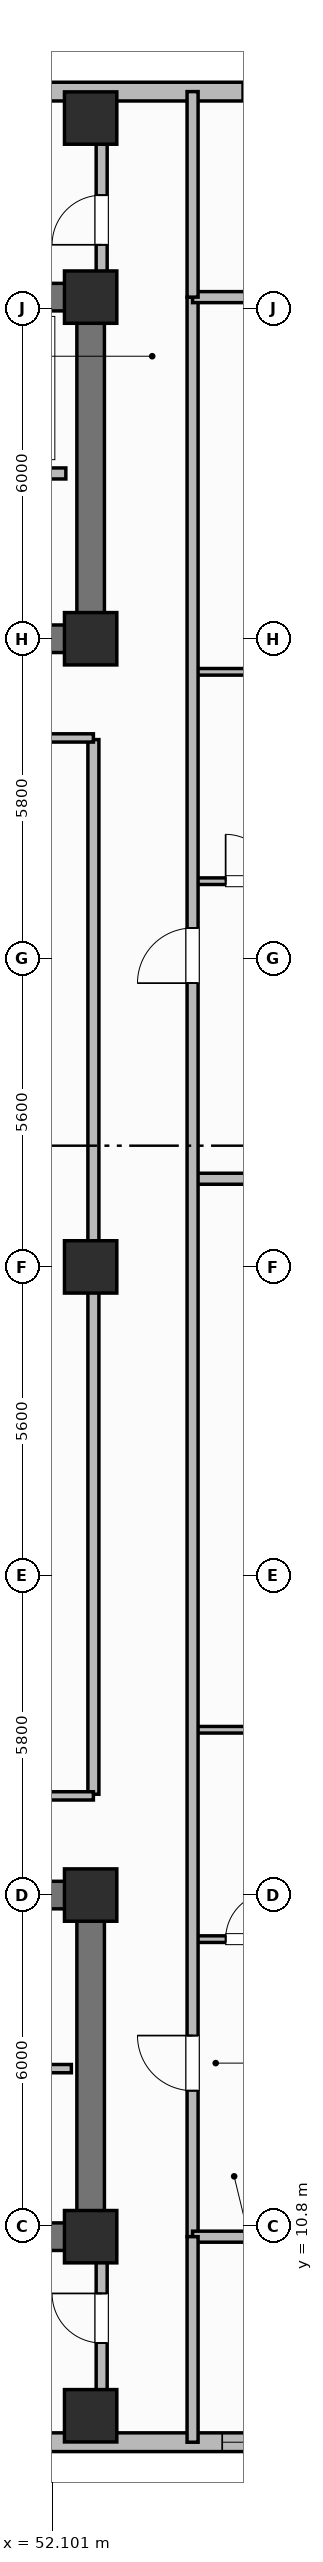
"""IFC4 building model, lengths in metres.
Left out: names, types, materials, properties, quantities, classifications, styles, units other than length and angle.
Written with IfcOpenShell. Run it as: python <this file> out.ifc"""

import sys

from ifc_helpers import new_model, si_unit, direction, frame, frame_2d, origin, origin_2d, place, context, subcontext, project, spatial, rectangle, extrude, element, fill, save


model = new_model("IFC4")
c1 = context("Model", 3, precision=1e-05, world=origin(), true_north=direction((0.0, 1.0)))
c2 = subcontext(c1, "Body", "Model", "MODEL_VIEW")
j1 = project(units=[si_unit("LENGTHUNIT", "METRE"), si_unit("PLANEANGLEUNIT", "RADIAN")], contexts=[c1])
p1 = place(None, origin())
s1 = spatial("IfcSite", under=j1, at=p1, CompositionType="ELEMENT")
p2 = place(p1, origin())
s2 = spatial("IfcBuilding", under=s1, at=p2, CompositionType="ELEMENT")
p3 = place(p2, frame((0.0, 0.0, 162.6)))
s3 = spatial("IfcBuildingStorey", under=s2, at=p3, CompositionType="ELEMENT", Elevation=162.6)
p4 = place(p3, frame((52.8, 10.6, 0.0), z_axis=(0.0, 0.0, 1.0), x_axis=(-1.0, 0.0, 0.0)))
e1 = element("IfcWall", 1, at=p4, inside=s3, PredefinedType="SHEAR", context=c2, shape_type="SweptSolid", body=[
    extrude(rectangle(XDim=27.2, YDim=0.5, at=frame_2d((13.6, 0.0))), origin(), (0.0, 0.0, 1.0), 3.7),
])
p5 = place(p3, frame((52.8, 10.85, 0.0), z_axis=(0.0, 0.0, 1.0), x_axis=(0.0, 1.0, 0.0)))
e2 = element("IfcWall", 2, at=p5, inside=s3, PredefinedType="SHEAR", context=c2, shape_type="SweptSolid", body=[
    extrude(rectangle(XDim=5.7, YDim=0.5, at=frame_2d((2.85, 0.0))), origin(), (0.0, 0.0, 1.0), 3.7),
])
p6 = place(p3, frame((25.6, 16.8, 0.0), z_axis=(0.0, 0.0, 1.0), x_axis=(1.0, 0.0, 0.0)))
e3 = element("IfcWall", 3, at=p6, inside=s3, PredefinedType="SHEAR", context=c2, shape_type="SweptSolid", body=[
    extrude(rectangle(XDim=27.2, YDim=0.5, at=frame_2d((13.6, 0.0))), origin(), (0.0, 0.0, 1.0), 3.7),
])
p7 = place(p6, frame((1.7, 0.0, 0.0)))
e4 = element("IfcOpeningElement", 4, at=p7, cuts=e3, PredefinedType="OPENING", context=c2, shape_type="SweptSolid", body=[
    extrude(rectangle(XDim=1.1, YDim=2.15, at=frame_2d((0.55, 1.075))), frame((0.0, 0.26, 0.0), z_axis=(0.0, -1.0, 0.0), x_axis=(1.0, 0.0, 0.0)), (0.0, 0.0, 1.0), 0.52),
])
p8 = place(p6, frame((4.45, 0.0, 0.0)))
e5 = element("IfcOpeningElement", 5, at=p8, cuts=e3, PredefinedType="OPENING", context=c2, shape_type="SweptSolid", body=[
    extrude(rectangle(XDim=0.85, YDim=2.1, at=frame_2d((0.425, 1.05))), frame((0.0, 0.26, 0.0), z_axis=(0.0, -1.0, 0.0), x_axis=(1.0, 0.0, 0.0)), (0.0, 0.0, 1.0), 0.52),
])
p9 = place(p6, frame((6.5, 0.0, 0.0)))
e6 = element("IfcOpeningElement", 6, at=p9, cuts=e3, PredefinedType="OPENING", context=c2, shape_type="SweptSolid", body=[
    extrude(rectangle(XDim=0.85, YDim=2.1, at=frame_2d((0.425, 1.05))), frame((0.0, 0.26, 0.0), z_axis=(0.0, -1.0, 0.0), x_axis=(1.0, 0.0, 0.0)), (0.0, 0.0, 1.0), 0.52),
])
p10 = place(p6, frame((13.0, 0.0, 0.0)))
e7 = element("IfcOpeningElement", 7, at=p10, cuts=e3, PredefinedType="OPENING", context=c2, shape_type="SweptSolid", body=[
    extrude(rectangle(XDim=1.2, YDim=2.15, at=frame_2d((0.6, 1.075))), frame((0.0, 0.26, 0.0), z_axis=(0.0, -1.0, 0.0), x_axis=(1.0, 0.0, 0.0)), (0.0, 0.0, 1.0), 0.52),
])
p11 = place(p6, frame((19.8, 0.0, 0.0)))
e8 = element("IfcOpeningElement", 8, at=p11, cuts=e3, PredefinedType="OPENING", context=c2, shape_type="SweptSolid", body=[
    extrude(rectangle(XDim=0.85, YDim=2.1, at=frame_2d((0.425, 1.05))), frame((0.0, 0.26, 0.0), z_axis=(0.0, -1.0, 0.0), x_axis=(1.0, 0.0, 0.0)), (0.0, 0.0, 1.0), 0.52),
])
p12 = place(p6, frame((24.2, 0.0, 0.0)))
e9 = element("IfcOpeningElement", 9, at=p12, cuts=e3, PredefinedType="OPENING", context=c2, shape_type="SweptSolid", body=[
    extrude(rectangle(XDim=0.85, YDim=2.1, at=frame_2d((0.425, 1.05))), frame((0.0, 0.26, 0.0), z_axis=(0.0, -1.0, 0.0), x_axis=(1.0, 0.0, 0.0)), (0.0, 0.0, 1.0), 0.52),
])
p13 = place(p3, frame((25.6, 45.8, 0.0), z_axis=(0.0, 0.0, 1.0), x_axis=(1.0, 0.0, 0.0)))
e10 = element("IfcWall", 10, at=p13, inside=s3, PredefinedType="SHEAR", context=c2, shape_type="SweptSolid", body=[
    extrude(rectangle(XDim=27.2, YDim=0.5, at=frame_2d((13.6, 0.0))), origin(), (0.0, 0.0, 1.0), 3.7),
])
p14 = place(p3, frame((52.8, 39.85, 0.0), z_axis=(0.0, 0.0, 1.0), x_axis=(0.0, 1.0, 0.0)))
e11 = element("IfcWall", 11, at=p14, inside=s3, PredefinedType="SHEAR", context=c2, shape_type="SweptSolid", body=[
    extrude(rectangle(XDim=5.7, YDim=0.5, at=frame_2d((2.85, 0.0))), origin(), (0.0, 0.0, 1.0), 3.7),
])
p15 = place(p3, frame((52.8, 39.6, 0.0), z_axis=(0.0, 0.0, 1.0), x_axis=(-1.0, 0.0, 0.0)))
e12 = element("IfcWall", 12, at=p15, inside=s3, PredefinedType="SHEAR", context=c2, shape_type="SweptSolid", body=[
    extrude(rectangle(XDim=27.2, YDim=0.5, at=frame_2d((13.6, 0.0))), origin(), (0.0, 0.0, 1.0), 3.7),
])
p16 = place(p15, frame((24.3, 0.0, 0.0)))
e13 = element("IfcOpeningElement", 13, at=p16, cuts=e12, PredefinedType="OPENING", context=c2, shape_type="SweptSolid", body=[
    extrude(rectangle(XDim=1.1, YDim=2.15, at=frame_2d((0.55, 1.075))), frame((0.0, 0.26, 0.0), z_axis=(0.0, -1.0, 0.0), x_axis=(1.0, 0.0, 0.0)), (0.0, 0.0, 1.0), 0.52),
])
p17 = place(p15, frame((21.85, 0.0, 0.0)))
e14 = element("IfcOpeningElement", 14, at=p17, cuts=e12, PredefinedType="OPENING", context=c2, shape_type="SweptSolid", body=[
    extrude(rectangle(XDim=0.85, YDim=2.1, at=frame_2d((0.425, 1.05))), frame((0.0, 0.26, 0.0), z_axis=(0.0, -1.0, 0.0), x_axis=(1.0, 0.0, 0.0)), (0.0, 0.0, 1.0), 0.52),
])
p18 = place(p15, frame((19.85, 0.0, 0.0)))
e15 = element("IfcOpeningElement", 15, at=p18, cuts=e12, PredefinedType="OPENING", context=c2, shape_type="SweptSolid", body=[
    extrude(rectangle(XDim=0.85, YDim=2.1, at=frame_2d((0.425, 1.05))), frame((0.0, 0.26, 0.0), z_axis=(0.0, -1.0, 0.0), x_axis=(1.0, 0.0, 0.0)), (0.0, 0.0, 1.0), 0.52),
])
p19 = place(p15, frame((15.1, 0.0, 0.0)))
e16 = element("IfcOpeningElement", 16, at=p19, cuts=e12, PredefinedType="OPENING", context=c2, shape_type="SweptSolid", body=[
    extrude(rectangle(XDim=1.2, YDim=2.15, at=frame_2d((0.6, 1.075))), frame((0.0, 0.26, 0.0), z_axis=(0.0, -1.0, 0.0), x_axis=(1.0, 0.0, 0.0)), (0.0, 0.0, 1.0), 0.52),
])
p20 = place(p15, frame((12.6, 0.0, 0.0)))
e17 = element("IfcOpeningElement", 17, at=p20, cuts=e12, PredefinedType="OPENING", context=c2, shape_type="SweptSolid", body=[
    extrude(rectangle(XDim=0.85, YDim=2.1, at=frame_2d((0.425, 1.05))), frame((0.0, 0.26, 0.0), z_axis=(0.0, -1.0, 0.0), x_axis=(1.0, 0.0, 0.0)), (0.0, 0.0, 1.0), 0.52),
])
p21 = place(p15, frame((10.85, 0.0, 0.0)))
e18 = element("IfcOpeningElement", 18, at=p21, cuts=e12, PredefinedType="OPENING", context=c2, shape_type="SweptSolid", body=[
    extrude(rectangle(XDim=0.85, YDim=2.1, at=frame_2d((0.425, 1.05))), frame((0.0, 0.26, 0.0), z_axis=(0.0, -1.0, 0.0), x_axis=(1.0, 0.0, 0.0)), (0.0, 0.0, 1.0), 0.52),
])
p22 = place(p15, frame((7.35, 0.0, 0.0)))
e19 = element("IfcOpeningElement", 19, at=p22, cuts=e12, PredefinedType="OPENING", context=c2, shape_type="SweptSolid", body=[
    extrude(rectangle(XDim=0.85, YDim=2.1, at=frame_2d((0.425, 1.05))), frame((0.0, 0.26, 0.0), z_axis=(0.0, -1.0, 0.0), x_axis=(1.0, 0.0, 0.0)), (0.0, 0.0, 1.0), 0.52),
])
p23 = place(p15, frame((5.35, 0.0, 0.0)))
e20 = element("IfcOpeningElement", 20, at=p23, cuts=e12, PredefinedType="OPENING", context=c2, shape_type="SweptSolid", body=[
    extrude(rectangle(XDim=0.85, YDim=2.1, at=frame_2d((0.425, 1.05))), frame((0.0, 0.26, 0.0), z_axis=(0.0, -1.0, 0.0), x_axis=(1.0, 0.0, 0.0)), (0.0, 0.0, 1.0), 0.52),
])
p24 = place(p15, frame((2.0, 0.0, 0.0)))
e21 = element("IfcOpeningElement", 21, at=p24, cuts=e12, PredefinedType="OPENING", context=c2, shape_type="SweptSolid", body=[
    extrude(rectangle(XDim=0.85, YDim=2.1, at=frame_2d((0.425, 1.05))), frame((0.0, 0.26, 0.0), z_axis=(0.0, -1.0, 0.0), x_axis=(1.0, 0.0, 0.0)), (0.0, 0.0, 1.0), 0.52),
])
for number, where, z_axis, x_axis in (
    (22, (52.8, 10.6, 0.0), (0.0, 0.0, 1.0), (1.0, 0.0, 0.0)),
    (23, (52.8, 16.8, 0.0), (0.0, 0.0, 1.0), (1.0, 0.0, 0.0)),
    (24, (52.8, 39.6, 0.0), (0.0, 0.0, 1.0), (1.0, 0.0, 0.0)),
    (25, (52.8, 45.8, 0.0), (0.0, 0.0, 1.0), (1.0, 0.0, 0.0)),
    (26, (52.8, 28.2, 0.0), (0.0, 0.0, 1.0), (1.0, 0.0, 0.0)),
    (27, (52.8, 7.35, 0.0), (0.0, 0.0, 1.0), (1.0, 0.0, 0.0)),
    (28, (52.8, 49.05, 0.0), (0.0, 0.0, 1.0), (1.0, 0.0, 0.0)),
):
    element("IfcColumn", number, at=place(p3, frame(where, z_axis=z_axis, x_axis=x_axis)), inside=s3, PredefinedType="COLUMN", context=c2, shape_type="SweptSolid", body=[
        extrude(rectangle(XDim=0.95, YDim=0.95, at=origin_2d()), origin(), (0.0, 0.0, 1.0), 3.7),
    ])
p25 = place(p3, frame((42.4, 6.87, 0.0), z_axis=(0.0, 0.0, 1.0), x_axis=(1.0, 0.0, 0.0)))
e29 = element("IfcWall", 29, at=p25, inside=s3, PredefinedType="SOLIDWALL", context=c2, shape_type="SweptSolid", body=[
    extrude(rectangle(XDim=15.8, YDim=0.34, at=frame_2d((7.9, 0.0))), origin(), (0.0, 0.0, 1.0), 2.72),
])
p26 = place(p25, frame((2.262, 0.0, 0.75)))
e30 = element("IfcOpeningElement", 30, at=p26, cuts=e29, PredefinedType="OPENING", context=c2, shape_type="SweptSolid", body=[
    extrude(rectangle(XDim=1.8, YDim=1.85, at=frame_2d((0.9, 0.925))), frame((0.0, 0.18, 0.0), z_axis=(0.0, -1.0, 0.0), x_axis=(1.0, 0.0, 0.0)), (0.0, 0.0, 1.0), 0.36),
])
p27 = place(p25, frame((5.188, 0.0, 0.75)))
e31 = element("IfcOpeningElement", 31, at=p27, cuts=e29, PredefinedType="OPENING", context=c2, shape_type="SweptSolid", body=[
    extrude(rectangle(XDim=1.8, YDim=1.85, at=frame_2d((0.9, 0.925))), frame((0.0, 0.18, 0.0), z_axis=(0.0, -1.0, 0.0), x_axis=(1.0, 0.0, 0.0)), (0.0, 0.0, 1.0), 0.36),
])
p28 = place(p25, frame((12.788, 0.0, 0.75)))
e32 = element("IfcOpeningElement", 32, at=p28, cuts=e29, PredefinedType="OPENING", context=c2, shape_type="SweptSolid", body=[
    extrude(rectangle(XDim=1.8, YDim=1.85, at=frame_2d((0.9, 0.925))), frame((0.0, 0.18, 0.0), z_axis=(0.0, -1.0, 0.0), x_axis=(1.0, 0.0, 0.0)), (0.0, 0.0, 1.0), 0.36),
])
p29 = place(p3, frame((58.2, 49.53, 0.0), z_axis=(0.0, 0.0, 1.0), x_axis=(-1.0, 0.0, 0.0)))
e33 = element("IfcWall", 33, at=p29, inside=s3, PredefinedType="SOLIDWALL", context=c2, shape_type="SweptSolid", body=[
    extrude(rectangle(XDim=15.8, YDim=0.34, at=frame_2d((7.9, 0.0))), origin(), (0.0, 0.0, 1.0), 2.72),
])
p30 = place(p29, frame((1.55, 0.0, 0.95)))
e34 = element("IfcOpeningElement", 34, at=p30, cuts=e33, PredefinedType="OPENING", context=c2, shape_type="SweptSolid", body=[
    extrude(rectangle(XDim=1.1, YDim=1.65, at=frame_2d((0.55, 0.825))), frame((0.0, 0.18, 0.0), z_axis=(0.0, -1.0, 0.0), x_axis=(1.0, 0.0, 0.0)), (0.0, 0.0, 1.0), 0.36),
])
p31 = place(p29, frame((7.35, 0.0, 0.95)))
e35 = element("IfcOpeningElement", 35, at=p31, cuts=e33, PredefinedType="OPENING", context=c2, shape_type="SweptSolid", body=[
    extrude(rectangle(XDim=1.1, YDim=1.65, at=frame_2d((0.55, 0.825))), frame((0.0, 0.18, 0.0), z_axis=(0.0, -1.0, 0.0), x_axis=(1.0, 0.0, 0.0)), (0.0, 0.0, 1.0), 0.36),
])
p32 = place(p29, frame((11.3, 0.0, 0.95)))
e36 = element("IfcOpeningElement", 36, at=p32, cuts=e33, PredefinedType="OPENING", context=c2, shape_type="SweptSolid", body=[
    extrude(rectangle(XDim=1.1, YDim=1.65, at=frame_2d((0.55, 0.825))), frame((0.0, 0.18, 0.0), z_axis=(0.0, -1.0, 0.0), x_axis=(1.0, 0.0, 0.0)), (0.0, 0.0, 1.0), 0.36),
])
p33 = place(p3, frame((48.05, 13.65, 0.0), z_axis=(0.0, 0.0, 1.0), x_axis=(1.0, 0.0, 0.0)))
e37 = element("IfcWall", 37, at=p33, inside=s3, PredefinedType="PARTITIONING", context=c2, shape_type="SweptSolid", body=[
    extrude(rectangle(XDim=4.4, YDim=0.15, at=frame_2d((2.2, 0.0))), origin(), (0.0, 0.0, 1.0), 2.55),
])
p34 = place(p33, frame((1.6, 0.0, 0.0)))
e38 = element("IfcOpeningElement", 38, at=p34, cuts=e37, PredefinedType="OPENING", context=c2, shape_type="SweptSolid", body=[
    extrude(rectangle(XDim=0.85, YDim=2.1, at=frame_2d((0.425, 1.05))), frame((0.0, 0.085, 0.0), z_axis=(0.0, -1.0, 0.0), x_axis=(1.0, 0.0, 0.0)), (0.0, 0.0, 1.0), 0.17),
])
p35 = place(p3, frame((52.35, 42.6, 0.0), z_axis=(0.0, 0.0, 1.0), x_axis=(-1.0, 0.0, 0.0)))
e39 = element("IfcWall", 39, at=p35, inside=s3, PredefinedType="PARTITIONING", context=c2, shape_type="SweptSolid", body=[
    extrude(rectangle(XDim=6.5, YDim=0.2, at=frame_2d((3.25, 0.0))), origin(), (0.0, 0.0, 1.0), 2.55),
])
p36 = place(p3, frame((52.85, 18.63, 0.0), z_axis=(0.0, 0.0, 1.0), x_axis=(0.0, 1.0, 0.0)))
e40 = element("IfcWall", 40, at=p36, inside=s3, PredefinedType="PARTITIONING", context=c2, shape_type="SweptSolid", body=[
    extrude(rectangle(XDim=19.14, YDim=0.2, at=frame_2d((9.57, 0.0))), origin(), (0.0, 0.0, 1.0), 2.55),
])
for number, where, z_axis, x_axis in (
    (41, (31.35, 18.6, 0.0), (0.0, 0.0, 1.0), (1.0, 0.0, 0.0)),
    (42, (31.35, 37.8, 0.0), (0.0, 0.0, 1.0), (1.0, 0.0, 0.0)),
):
    element("IfcWall", number, at=place(p3, frame(where, z_axis=z_axis, x_axis=x_axis)), inside=s3, PredefinedType="PARTITIONING", context=c2, shape_type="SweptSolid", body=[
        extrude(rectangle(XDim=21.5, YDim=0.15, at=frame_2d((10.75, 0.0))), origin(), (0.0, 0.0, 1.0), 2.55),
    ])
p37 = place(p3, frame((54.65, 16.0, 0.0), z_axis=(0.0, 0.0, 1.0), x_axis=(1.0, 0.0, 0.0)))
e43 = element("IfcWall", 43, at=p37, inside=s3, PredefinedType="PARTITIONING", context=c2, shape_type="SweptSolid", body=[
    extrude(rectangle(XDim=2.25, YDim=0.12, at=frame_2d((1.125, 0.0))), origin(), (0.0, 0.0, 1.0), 2.55),
])
p38 = place(p37, frame((0.6, 0.0, 0.0)))
e44 = element("IfcOpeningElement", 44, at=p38, cuts=e43, PredefinedType="OPENING", context=c2, shape_type="SweptSolid", body=[
    extrude(rectangle(XDim=0.85, YDim=2.1, at=frame_2d((0.425, 1.05))), frame((0.0, 0.07, 0.0), z_axis=(0.0, -1.0, 0.0), x_axis=(1.0, 0.0, 0.0)), (0.0, 0.0, 1.0), 0.14),
])
p39 = place(p3, frame((54.65, 19.8, 0.0), z_axis=(0.0, 0.0, 1.0), x_axis=(1.0, 0.0, 0.0)))
e45 = element("IfcWall", 45, at=p39, inside=s3, PredefinedType="PARTITIONING", context=c2, shape_type="SweptSolid", body=[
    extrude(rectangle(XDim=2.25, YDim=0.12, at=frame_2d((1.125, 0.0))), origin(), (0.0, 0.0, 1.0), 2.55),
])
p40 = place(p3, frame((54.65, 29.8, 0.0), z_axis=(0.0, 0.0, 1.0), x_axis=(1.0, 0.0, 0.0)))
e46 = element("IfcWall", 46, at=p40, inside=s3, PredefinedType="PARTITIONING", context=c2, shape_type="SweptSolid", body=[
    extrude(rectangle(XDim=6.666, YDim=0.2, at=frame_2d((3.333, 0.0))), origin(), (0.0, 0.0, 1.0), 2.55),
])
p41 = place(p3, frame((54.65, 35.2, 0.0), z_axis=(0.0, 0.0, 1.0), x_axis=(1.0, 0.0, 0.0)))
e47 = element("IfcWall", 47, at=p41, inside=s3, PredefinedType="PARTITIONING", context=c2, shape_type="SweptSolid", body=[
    extrude(rectangle(XDim=2.25, YDim=0.12, at=frame_2d((1.125, 0.0))), origin(), (0.0, 0.0, 1.0), 2.55),
])
p42 = place(p41, frame((0.6, 0.0, 0.0)))
e48 = element("IfcOpeningElement", 48, at=p42, cuts=e47, PredefinedType="OPENING", context=c2, shape_type="SweptSolid", body=[
    extrude(rectangle(XDim=0.85, YDim=2.1, at=frame_2d((0.425, 1.05))), frame((0.0, 0.07, 0.0), z_axis=(0.0, -1.0, 0.0), x_axis=(1.0, 0.0, 0.0)), (0.0, 0.0, 1.0), 0.14),
])
p43 = place(p3, frame((54.65, 39.0, 0.0), z_axis=(0.0, 0.0, 1.0), x_axis=(1.0, 0.0, 0.0)))
e49 = element("IfcWall", 49, at=p43, inside=s3, PredefinedType="PARTITIONING", context=c2, shape_type="SweptSolid", body=[
    extrude(rectangle(XDim=2.25, YDim=0.12, at=frame_2d((1.125, 0.0))), origin(), (0.0, 0.0, 1.0), 2.55),
])
p44 = place(p3, frame((54.65, 10.6, 0.0), z_axis=(0.0, 0.0, 1.0), x_axis=(0.0, 1.0, 0.0)))
e50 = element("IfcWall", 50, at=p44, inside=s3, PredefinedType="PARTITIONING", context=c2, shape_type="SweptSolid", body=[
    extrude(rectangle(XDim=35.2, YDim=0.2, at=frame_2d((17.6, 0.0))), origin(), (0.0, 0.0, 1.0), 2.55),
])
p45 = place(p44, frame((2.65, 0.0, 0.0)))
e51 = element("IfcOpeningElement", 51, at=p45, cuts=e50, PredefinedType="OPENING", context=c2, shape_type="SweptSolid", body=[
    extrude(rectangle(XDim=1.0, YDim=2.15, at=frame_2d((0.5, 1.075))), frame((0.0, 0.11, 0.0), z_axis=(0.0, -1.0, 0.0), x_axis=(1.0, 0.0, 0.0)), (0.0, 0.0, 1.0), 0.22),
])
p46 = place(p44, frame((22.75, 0.0, 0.0)))
e52 = element("IfcOpeningElement", 52, at=p46, cuts=e50, PredefinedType="OPENING", context=c2, shape_type="SweptSolid", body=[
    extrude(rectangle(XDim=1.0, YDim=2.15, at=frame_2d((0.5, 1.075))), frame((0.0, 0.11, 0.0), z_axis=(0.0, -1.0, 0.0), x_axis=(1.0, 0.0, 0.0)), (0.0, 0.0, 1.0), 0.22),
])
for number, where, z_axis, x_axis in (
    (53, (54.65, 10.6, 0.0), (0.0, 0.0, 1.0), (1.0, 0.0, 0.0)),
    (54, (54.65, 45.8, 0.0), (0.0, 0.0, 1.0), (1.0, 0.0, 0.0)),
):
    element("IfcWall", number, at=place(p3, frame(where, z_axis=z_axis, x_axis=x_axis)), inside=s3, PredefinedType="PARTITIONING", context=c2, shape_type="SweptSolid", body=[
        extrude(rectangle(XDim=6.76, YDim=0.2, at=frame_2d((3.38, 0.0))), origin(), (0.0, 0.0, 1.0), 2.55),
    ])
for number, where, z_axis, x_axis in (
    (55, (54.65, 6.87, 0.0), (0.0, 0.0, 1.0), (0.0, 1.0, 0.0)),
    (56, (54.65, 45.8, 0.0), (0.0, 0.0, 1.0), (0.0, 1.0, 0.0)),
):
    element("IfcWall", number, at=place(p3, frame(where, z_axis=z_axis, x_axis=x_axis)), inside=s3, PredefinedType="PARTITIONING", context=c2, shape_type="SweptSolid", body=[
        extrude(rectangle(XDim=3.73, YDim=0.2, at=frame_2d((1.865, 0.0))), origin(), (0.0, 0.0, 1.0), 2.55),
    ])
p47 = place(p3, frame((53.0, 7.82, 0.0), z_axis=(0.0, 0.0, 1.0), x_axis=(0.0, 1.0, 0.0)))
e57 = element("IfcWall", 57, at=p47, inside=s3, PredefinedType="PARTITIONING", context=c2, shape_type="SweptSolid", body=[
    extrude(rectangle(XDim=2.48, YDim=0.2, at=frame_2d((1.24, 0.0))), origin(), (0.0, 0.0, 1.0), 2.55),
])
p48 = place(p47, frame((0.85, 0.0, 0.0)))
e58 = element("IfcOpeningElement", 58, at=p48, cuts=e57, PredefinedType="OPENING", context=c2, shape_type="SweptSolid", body=[
    extrude(rectangle(XDim=0.9, YDim=2.1, at=frame_2d((0.45, 1.05))), frame((0.0, 0.11, 0.0), z_axis=(0.0, -1.0, 0.0), x_axis=(1.0, 0.0, 0.0)), (0.0, 0.0, 1.0), 0.22),
])
p49 = place(p3, frame((53.0, 46.1, 0.0), z_axis=(0.0, 0.0, 1.0), x_axis=(0.0, 1.0, 0.0)))
e59 = element("IfcWall", 59, at=p49, inside=s3, PredefinedType="PARTITIONING", context=c2, shape_type="SweptSolid", body=[
    extrude(rectangle(XDim=2.48, YDim=0.2, at=frame_2d((1.24, 0.0))), origin(), (0.0, 0.0, 1.0), 2.55),
])
p50 = place(p49, frame((0.65, 0.0, 0.0)))
e60 = element("IfcOpeningElement", 60, at=p50, cuts=e59, PredefinedType="OPENING", context=c2, shape_type="SweptSolid", body=[
    extrude(rectangle(XDim=0.9, YDim=2.1, at=frame_2d((0.45, 1.05))), frame((0.0, 0.11, 0.0), z_axis=(0.0, -1.0, 0.0), x_axis=(1.0, 0.0, 0.0)), (0.0, 0.0, 1.0), 0.22),
])
p51 = place(p28, origin())
e61 = element("IfcWindow", 61, at=p51, inside=s3, PartitioningType="SINGLE_PANEL", PredefinedType="WINDOW", context=c2, shape_type="SweptSolid", body=[
    extrude(rectangle(XDim=1.8, YDim=1.85, at=frame_2d((0.9, 0.925))), frame((0.0, 0.03, 0.0), z_axis=(0.0, -1.0, 0.0), x_axis=(1.0, 0.0, 0.0)), (0.0, 0.0, 1.0), 0.06),
])
fill(e32, e61)
p52 = place(p30, origin())
e62 = element("IfcWindow", 62, at=p52, inside=s3, PartitioningType="SINGLE_PANEL", PredefinedType="WINDOW", context=c2, shape_type="SweptSolid", body=[
    extrude(rectangle(XDim=1.1, YDim=1.65, at=frame_2d((0.55, 0.825))), frame((0.0, 0.03, 0.0), z_axis=(0.0, -1.0, 0.0), x_axis=(1.0, 0.0, 0.0)), (0.0, 0.0, 1.0), 0.06),
])
fill(e34, e62)
p53 = place(p38, origin())
e63 = element("IfcDoor", 63, at=p53, inside=s3, OperationType="SINGLE_SWING_RIGHT", PredefinedType="DOOR", context=c2, shape_type="SweptSolid", body=[
    extrude(rectangle(XDim=0.85, YDim=2.1, at=frame_2d((0.425, 1.05))), frame((0.0, 0.025, 0.0), z_axis=(0.0, -1.0, 0.0), x_axis=(1.0, 0.0, 0.0)), (0.0, 0.0, 1.0), 0.05),
])
fill(e44, e63)
p54 = place(p42, origin())
e64 = element("IfcDoor", 64, at=p54, inside=s3, OperationType="SINGLE_SWING_LEFT", PredefinedType="DOOR", context=c2, shape_type="SweptSolid", body=[
    extrude(rectangle(XDim=0.85, YDim=2.1, at=frame_2d((0.425, 1.05))), frame((0.0, 0.025, 0.0), z_axis=(0.0, -1.0, 0.0), x_axis=(1.0, 0.0, 0.0)), (0.0, 0.0, 1.0), 0.05),
])
fill(e48, e64)
p55 = place(p45, origin())
e65 = element("IfcDoor", 65, at=p55, inside=s3, OperationType="SINGLE_SWING_RIGHT", PredefinedType="DOOR", context=c2, shape_type="SweptSolid", body=[
    extrude(rectangle(XDim=1.0, YDim=2.15, at=frame_2d((0.5, 1.075))), frame((0.0, 0.025, 0.0), z_axis=(0.0, -1.0, 0.0), x_axis=(1.0, 0.0, 0.0)), (0.0, 0.0, 1.0), 0.05),
])
fill(e51, e65)
p56 = place(p46, origin())
e66 = element("IfcDoor", 66, at=p56, inside=s3, OperationType="SINGLE_SWING_LEFT", PredefinedType="DOOR", context=c2, shape_type="SweptSolid", body=[
    extrude(rectangle(XDim=1.0, YDim=2.15, at=frame_2d((0.5, 1.075))), frame((0.0, 0.025, 0.0), z_axis=(0.0, -1.0, 0.0), x_axis=(1.0, 0.0, 0.0)), (0.0, 0.0, 1.0), 0.05),
])
fill(e52, e66)
p57 = place(p48, origin())
e67 = element("IfcDoor", 67, at=p57, inside=s3, OperationType="SINGLE_SWING_RIGHT", PredefinedType="DOOR", context=c2, shape_type="SweptSolid", body=[
    extrude(rectangle(XDim=0.9, YDim=2.1, at=frame_2d((0.45, 1.05))), frame((0.0, 0.025, 0.0), z_axis=(0.0, -1.0, 0.0), x_axis=(1.0, 0.0, 0.0)), (0.0, 0.0, 1.0), 0.05),
])
fill(e58, e67)
p58 = place(p50, origin())
e68 = element("IfcDoor", 68, at=p58, inside=s3, OperationType="SINGLE_SWING_LEFT", PredefinedType="DOOR", context=c2, shape_type="SweptSolid", body=[
    extrude(rectangle(XDim=0.9, YDim=2.1, at=frame_2d((0.45, 1.05))), frame((0.0, 0.025, 0.0), z_axis=(0.0, -1.0, 0.0), x_axis=(1.0, 0.0, 0.0)), (0.0, 0.0, 1.0), 0.05),
])
fill(e60, e68)
save(model, sys.argv[1])
